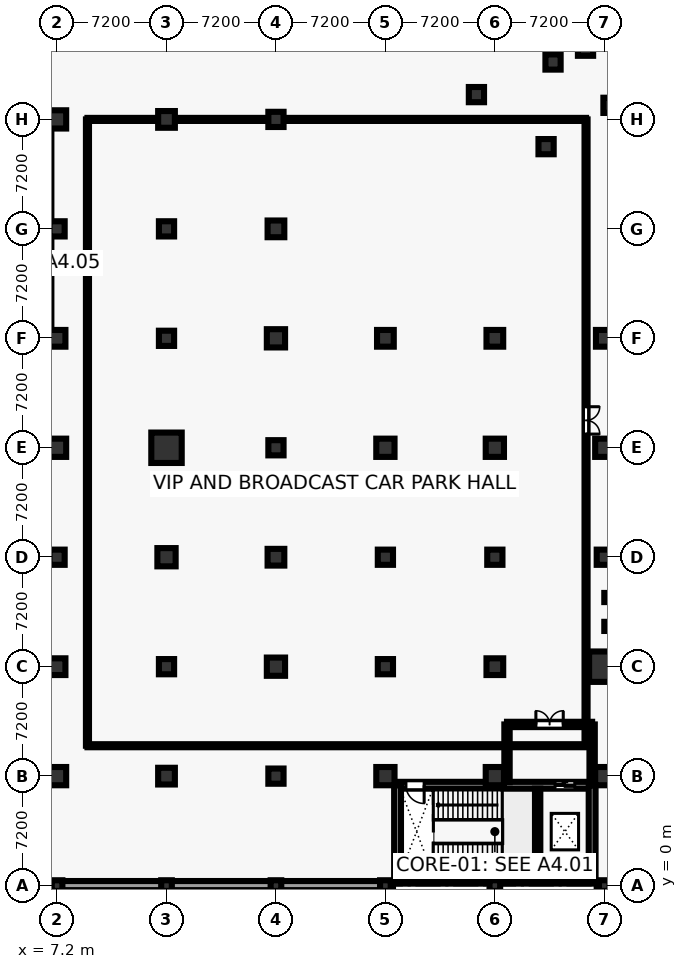
"""IFC4 building model, lengths in metres.
Left out: names, types, materials, properties, quantities, classifications, styles, units other than length and angle.
Written with IfcOpenShell. Run it as: python <this file> out.ifc"""

import sys

from ifc_helpers import new_model, si_unit, direction, frame, frame_2d, origin, origin_with_axes, origin_2d, place, context, subcontext, project, spatial, rectangle, circle, extrude, element, fill, save


model = new_model("IFC4")
c1 = context("Model", 3, precision=1e-05, world=origin(), true_north=direction((0.0, 1.0)))
c2 = subcontext(c1, "Body", "Model", "MODEL_VIEW")
j1 = project(units=[si_unit("LENGTHUNIT", "METRE"), si_unit("PLANEANGLEUNIT", "RADIAN")], contexts=[c1])
p1 = place(None, origin())
s1 = spatial("IfcSite", under=j1, at=p1, CompositionType="ELEMENT")
p2 = place(p1, origin())
s2 = spatial("IfcBuilding", under=s1, at=p2, CompositionType="ELEMENT")
p3 = place(p2, frame((0.0, 0.0, -5.4)))
s3 = spatial("IfcBuildingStorey", under=s2, at=p3, CompositionType="ELEMENT", Elevation=-5.4)
p4 = place(p3, frame((7.2, 0.0, 0.0), z_axis=(0.0, 0.0, 1.0), x_axis=(1.0, 0.0, 0.0)))
e1 = element("IfcColumn", 1, at=p4, inside=s3, PredefinedType="COLUMN", context=c2, shape_type="SweptSolid", body=[
    extrude(rectangle(XDim=0.7, YDim=0.7, at=origin_2d()), origin(), (0.0, 0.0, 1.0), 5.4),
])
p5 = place(p3, frame((7.2, 7.2, 0.0), z_axis=(0.0, 0.0, 1.0), x_axis=(1.0, 0.0, 0.0)))
e2 = element("IfcColumn", 2, at=p5, inside=s3, PredefinedType="COLUMN", context=c2, shape_type="SweptSolid", body=[
    extrude(circle(Radius=0.6, at=origin_2d()), origin(), (0.0, 0.0, 1.0), 5.4),
])
p6 = place(p3, frame((7.2, 14.4, 0.0), z_axis=(0.0, 0.0, 1.0), x_axis=(1.0, 0.0, 0.0)))
e3 = element("IfcColumn", 3, at=p6, inside=s3, PredefinedType="COLUMN", context=c2, shape_type="SweptSolid", body=[
    extrude(rectangle(XDim=1.1, YDim=1.1, at=origin_2d()), origin(), (0.0, 0.0, 1.0), 5.4),
])
p7 = place(p3, frame((7.2, 21.6, 0.0), z_axis=(0.0, 0.0, 1.0), x_axis=(1.0, 0.0, 0.0)))
e4 = element("IfcColumn", 4, at=p7, inside=s3, PredefinedType="COLUMN", context=c2, shape_type="SweptSolid", body=[
    extrude(rectangle(XDim=1.0, YDim=1.0, at=origin_2d()), origin(), (0.0, 0.0, 1.0), 5.4),
])
p8 = place(p3, frame((7.2, 28.8, 0.0), z_axis=(0.0, 0.0, 1.0), x_axis=(1.0, 0.0, 0.0)))
e5 = element("IfcColumn", 5, at=p8, inside=s3, PredefinedType="COLUMN", context=c2, shape_type="SweptSolid", body=[
    extrude(circle(Radius=0.6, at=origin_2d()), origin(), (0.0, 0.0, 1.0), 5.4),
])
p9 = place(p3, frame((7.2, 36.0, 0.0), z_axis=(0.0, 0.0, 1.0), x_axis=(1.0, 0.0, 0.0)))
e6 = element("IfcColumn", 6, at=p9, inside=s3, PredefinedType="COLUMN", context=c2, shape_type="SweptSolid", body=[
    extrude(rectangle(XDim=1.1, YDim=1.1, at=origin_2d()), origin(), (0.0, 0.0, 1.0), 5.4),
])
p10 = place(p3, frame((7.2, 43.2, 0.0), z_axis=(0.0, 0.0, 1.0), x_axis=(1.0, 0.0, 0.0)))
e7 = element("IfcColumn", 7, at=p10, inside=s3, PredefinedType="COLUMN", context=c2, shape_type="SweptSolid", body=[
    extrude(rectangle(XDim=1.0, YDim=1.0, at=origin_2d()), origin(), (0.0, 0.0, 1.0), 5.4),
])
p11 = place(p3, frame((7.2, 50.4, 0.0), z_axis=(0.0, 0.0, 1.0), x_axis=(1.0, 0.0, 0.0)))
e8 = element("IfcColumn", 8, at=p11, inside=s3, PredefinedType="COLUMN", context=c2, shape_type="SweptSolid", body=[
    extrude(circle(Radius=0.6, at=origin_2d()), origin(), (0.0, 0.0, 1.0), 5.4),
])
p12 = place(p3, frame((14.4, 0.0, 0.0), z_axis=(0.0, 0.0, 1.0), x_axis=(1.0, 0.0, 0.0)))
e9 = element("IfcColumn", 9, at=p12, inside=s3, PredefinedType="COLUMN", context=c2, shape_type="SweptSolid", body=[
    extrude(rectangle(XDim=0.7, YDim=0.7, at=origin_2d()), origin(), (0.0, 0.0, 1.0), 5.4),
])
p13 = place(p3, frame((14.4, 7.2, 0.0), z_axis=(0.0, 0.0, 1.0), x_axis=(1.0, 0.0, 0.0)))
e10 = element("IfcColumn", 10, at=p13, inside=s3, PredefinedType="COLUMN", context=c2, shape_type="SweptSolid", body=[
    extrude(rectangle(XDim=1.1, YDim=1.1, at=origin_2d()), origin(), (0.0, 0.0, 1.0), 5.4),
])
p14 = place(p3, frame((14.4, 14.4, 0.0), z_axis=(0.0, 0.0, 1.0), x_axis=(1.0, 0.0, 0.0)))
e11 = element("IfcColumn", 11, at=p14, inside=s3, PredefinedType="COLUMN", context=c2, shape_type="SweptSolid", body=[
    extrude(circle(Radius=0.5, at=origin_2d()), origin(), (0.0, 0.0, 1.0), 5.4),
])
p15 = place(p3, frame((14.4, 21.6, 0.0), z_axis=(0.0, 0.0, 1.0), x_axis=(1.0, 0.0, 0.0)))
e12 = element("IfcColumn", 12, at=p15, inside=s3, PredefinedType="COLUMN", context=c2, shape_type="SweptSolid", body=[
    extrude(circle(Radius=0.6, at=origin_2d()), origin(), (0.0, 0.0, 1.0), 5.4),
])
p16 = place(p3, frame((14.4, 28.8, 0.0), z_axis=(0.0, 0.0, 1.0), x_axis=(1.0, 0.0, 0.0)))
e13 = element("IfcColumn", 13, at=p16, inside=s3, PredefinedType="COLUMN", context=c2, shape_type="SweptSolid", body=[
    extrude(circle(Radius=1.0, at=origin_2d()), origin(), (0.0, 0.0, 1.0), 5.4),
])
p17 = place(p3, frame((14.4, 36.0, 0.0), z_axis=(0.0, 0.0, 1.0), x_axis=(1.0, 0.0, 0.0)))
e14 = element("IfcColumn", 14, at=p17, inside=s3, PredefinedType="COLUMN", context=c2, shape_type="SweptSolid", body=[
    extrude(rectangle(XDim=1.0, YDim=1.0, at=origin_2d()), origin(), (0.0, 0.0, 1.0), 5.4),
])
p18 = place(p3, frame((14.4, 43.2, 0.0), z_axis=(0.0, 0.0, 1.0), x_axis=(1.0, 0.0, 0.0)))
e15 = element("IfcColumn", 15, at=p18, inside=s3, PredefinedType="COLUMN", context=c2, shape_type="SweptSolid", body=[
    extrude(circle(Radius=0.5, at=origin_2d()), origin(), (0.0, 0.0, 1.0), 5.4),
])
p19 = place(p3, frame((14.4, 50.4, 0.0), z_axis=(0.0, 0.0, 1.0), x_axis=(1.0, 0.0, 0.0)))
e16 = element("IfcColumn", 16, at=p19, inside=s3, PredefinedType="COLUMN", context=c2, shape_type="SweptSolid", body=[
    extrude(rectangle(XDim=1.1, YDim=1.1, at=origin_2d()), origin(), (0.0, 0.0, 1.0), 5.4),
])
p20 = place(p3, frame((21.6, 0.0, 0.0), z_axis=(0.0, 0.0, 1.0), x_axis=(1.0, 0.0, 0.0)))
e17 = element("IfcColumn", 17, at=p20, inside=s3, PredefinedType="COLUMN", context=c2, shape_type="SweptSolid", body=[
    extrude(rectangle(XDim=0.7, YDim=0.7, at=origin_2d()), origin(), (0.0, 0.0, 1.0), 5.4),
])
p21 = place(p3, frame((21.6, 7.2, 0.0), z_axis=(0.0, 0.0, 1.0), x_axis=(1.0, 0.0, 0.0)))
e18 = element("IfcColumn", 18, at=p21, inside=s3, PredefinedType="COLUMN", context=c2, shape_type="SweptSolid", body=[
    extrude(rectangle(XDim=1.0, YDim=1.0, at=origin_2d()), origin(), (0.0, 0.0, 1.0), 5.4),
])
p22 = place(p3, frame((21.6, 14.4, 0.0), z_axis=(0.0, 0.0, 1.0), x_axis=(1.0, 0.0, 0.0)))
e19 = element("IfcColumn", 19, at=p22, inside=s3, PredefinedType="COLUMN", context=c2, shape_type="SweptSolid", body=[
    extrude(circle(Radius=0.6, at=origin_2d()), origin(), (0.0, 0.0, 1.0), 5.4),
])
p23 = place(p3, frame((21.6, 21.6, 0.0), z_axis=(0.0, 0.0, 1.0), x_axis=(1.0, 0.0, 0.0)))
e20 = element("IfcColumn", 20, at=p23, inside=s3, PredefinedType="COLUMN", context=c2, shape_type="SweptSolid", body=[
    extrude(rectangle(XDim=1.1, YDim=1.1, at=origin_2d()), origin(), (0.0, 0.0, 1.0), 5.4),
])
p24 = place(p3, frame((21.6, 28.8, 0.0), z_axis=(0.0, 0.0, 1.0), x_axis=(1.0, 0.0, 0.0)))
e21 = element("IfcColumn", 21, at=p24, inside=s3, PredefinedType="COLUMN", context=c2, shape_type="SweptSolid", body=[
    extrude(rectangle(XDim=1.0, YDim=1.0, at=origin_2d()), origin(), (0.0, 0.0, 1.0), 5.4),
])
p25 = place(p3, frame((21.6, 36.0, 0.0), z_axis=(0.0, 0.0, 1.0), x_axis=(1.0, 0.0, 0.0)))
e22 = element("IfcColumn", 22, at=p25, inside=s3, PredefinedType="COLUMN", context=c2, shape_type="SweptSolid", body=[
    extrude(circle(Radius=0.6, at=origin_2d()), origin(), (0.0, 0.0, 1.0), 5.4),
])
p26 = place(p3, frame((21.6, 43.2, 0.0), z_axis=(0.0, 0.0, 1.0), x_axis=(1.0, 0.0, 0.0)))
e23 = element("IfcColumn", 23, at=p26, inside=s3, PredefinedType="COLUMN", context=c2, shape_type="SweptSolid", body=[
    extrude(rectangle(XDim=1.1, YDim=1.1, at=origin_2d()), origin(), (0.0, 0.0, 1.0), 5.4),
])
p27 = place(p3, frame((21.6, 50.4, 0.0), z_axis=(0.0, 0.0, 1.0), x_axis=(1.0, 0.0, 0.0)))
e24 = element("IfcColumn", 24, at=p27, inside=s3, PredefinedType="COLUMN", context=c2, shape_type="SweptSolid", body=[
    extrude(rectangle(XDim=1.0, YDim=1.0, at=origin_2d()), origin(), (0.0, 0.0, 1.0), 5.4),
])
p28 = place(p3, frame((28.8, 0.0, 0.0), z_axis=(0.0, 0.0, 1.0), x_axis=(1.0, 0.0, 0.0)))
e25 = element("IfcColumn", 25, at=p28, inside=s3, PredefinedType="COLUMN", context=c2, shape_type="SweptSolid", body=[
    extrude(rectangle(XDim=0.7, YDim=0.7, at=origin_2d()), origin(), (0.0, 0.0, 1.0), 5.4),
])
p29 = place(p3, frame((28.8, 7.2, 0.0), z_axis=(0.0, 0.0, 1.0), x_axis=(1.0, 0.0, 0.0)))
e26 = element("IfcColumn", 26, at=p29, inside=s3, PredefinedType="COLUMN", context=c2, shape_type="SweptSolid", body=[
    extrude(circle(Radius=0.6, at=origin_2d()), origin(), (0.0, 0.0, 1.0), 5.4),
])
p30 = place(p3, frame((28.8, 14.4, 0.0), z_axis=(0.0, 0.0, 1.0), x_axis=(1.0, 0.0, 0.0)))
e27 = element("IfcColumn", 27, at=p30, inside=s3, PredefinedType="COLUMN", context=c2, shape_type="SweptSolid", body=[
    extrude(circle(Radius=0.5, at=origin_2d()), origin(), (0.0, 0.0, 1.0), 5.4),
])
p31 = place(p3, frame((28.8, 21.6, 0.0), z_axis=(0.0, 0.0, 1.0), x_axis=(1.0, 0.0, 0.0)))
e28 = element("IfcColumn", 28, at=p31, inside=s3, PredefinedType="COLUMN", context=c2, shape_type="SweptSolid", body=[
    extrude(rectangle(XDim=1.0, YDim=1.0, at=origin_2d()), origin(), (0.0, 0.0, 1.0), 5.4),
])
p32 = place(p3, frame((28.8, 28.8, 0.0), z_axis=(0.0, 0.0, 1.0), x_axis=(1.0, 0.0, 0.0)))
e29 = element("IfcColumn", 29, at=p32, inside=s3, PredefinedType="COLUMN", context=c2, shape_type="SweptSolid", body=[
    extrude(circle(Radius=0.6, at=origin_2d()), origin(), (0.0, 0.0, 1.0), 5.4),
])
p33 = place(p3, frame((28.8, 36.0, 0.0), z_axis=(0.0, 0.0, 1.0), x_axis=(1.0, 0.0, 0.0)))
e30 = element("IfcColumn", 30, at=p33, inside=s3, PredefinedType="COLUMN", context=c2, shape_type="SweptSolid", body=[
    extrude(rectangle(XDim=1.1, YDim=1.1, at=origin_2d()), origin(), (0.0, 0.0, 1.0), 5.4),
])
p34 = place(p3, frame((36.0, 0.0, 0.0), z_axis=(0.0, 0.0, 1.0), x_axis=(1.0, 0.0, 0.0)))
e31 = element("IfcColumn", 31, at=p34, inside=s3, PredefinedType="COLUMN", context=c2, shape_type="SweptSolid", body=[
    extrude(rectangle(XDim=0.7, YDim=0.7, at=origin_2d()), origin(), (0.0, 0.0, 1.0), 5.4),
])
p35 = place(p3, frame((36.0, 7.2, 0.0), z_axis=(0.0, 0.0, 1.0), x_axis=(1.0, 0.0, 0.0)))
e32 = element("IfcColumn", 32, at=p35, inside=s3, PredefinedType="COLUMN", context=c2, shape_type="SweptSolid", body=[
    extrude(circle(Radius=0.6, at=origin_2d()), origin(), (0.0, 0.0, 1.0), 5.4),
])
p36 = place(p3, frame((36.0, 14.4, 0.0), z_axis=(0.0, 0.0, 1.0), x_axis=(1.0, 0.0, 0.0)))
e33 = element("IfcColumn", 33, at=p36, inside=s3, PredefinedType="COLUMN", context=c2, shape_type="SweptSolid", body=[
    extrude(rectangle(XDim=1.1, YDim=1.1, at=origin_2d()), origin(), (0.0, 0.0, 1.0), 5.4),
])
p37 = place(p3, frame((36.0, 21.6, 0.0), z_axis=(0.0, 0.0, 1.0), x_axis=(1.0, 0.0, 0.0)))
e34 = element("IfcColumn", 34, at=p37, inside=s3, PredefinedType="COLUMN", context=c2, shape_type="SweptSolid", body=[
    extrude(rectangle(XDim=1.0, YDim=1.0, at=origin_2d()), origin(), (0.0, 0.0, 1.0), 5.4),
])
p38 = place(p3, frame((36.0, 28.8, 0.0), z_axis=(0.0, 0.0, 1.0), x_axis=(1.0, 0.0, 0.0)))
e35 = element("IfcColumn", 35, at=p38, inside=s3, PredefinedType="COLUMN", context=c2, shape_type="SweptSolid", body=[
    extrude(circle(Radius=0.6, at=origin_2d()), origin(), (0.0, 0.0, 1.0), 5.4),
])
p39 = place(p3, frame((36.0, 36.0, 0.0), z_axis=(0.0, 0.0, 1.0), x_axis=(1.0, 0.0, 0.0)))
e36 = element("IfcColumn", 36, at=p39, inside=s3, PredefinedType="COLUMN", context=c2, shape_type="SweptSolid", body=[
    extrude(rectangle(XDim=1.1, YDim=1.1, at=origin_2d()), origin(), (0.0, 0.0, 1.0), 5.4),
])
p40 = place(p3, frame((43.2, 0.0, 0.0), z_axis=(0.0, 0.0, 1.0), x_axis=(1.0, 0.0, 0.0)))
e37 = element("IfcColumn", 37, at=p40, inside=s3, PredefinedType="COLUMN", context=c2, shape_type="SweptSolid", body=[
    extrude(rectangle(XDim=0.7, YDim=0.7, at=origin_2d()), origin(), (0.0, 0.0, 1.0), 5.4),
])
p41 = place(p3, frame((43.2, 7.2, 0.0), z_axis=(0.0, 0.0, 1.0), x_axis=(1.0, 0.0, 0.0)))
e38 = element("IfcColumn", 38, at=p41, inside=s3, PredefinedType="COLUMN", context=c2, shape_type="SweptSolid", body=[
    extrude(circle(Radius=0.6, at=origin_2d()), origin(), (0.0, 0.0, 1.0), 5.4),
])
p42 = place(p3, frame((43.2, 14.4, 0.0), z_axis=(0.0, 0.0, 1.0), x_axis=(1.0, 0.0, 0.0)))
e39 = element("IfcColumn", 39, at=p42, inside=s3, PredefinedType="COLUMN", context=c2, shape_type="SweptSolid", body=[
    extrude(circle(Radius=1.0, at=origin_2d()), origin(), (0.0, 0.0, 1.0), 5.4),
])
p43 = place(p3, frame((43.2, 21.6, 0.0), z_axis=(0.0, 0.0, 1.0), x_axis=(1.0, 0.0, 0.0)))
e40 = element("IfcColumn", 40, at=p43, inside=s3, PredefinedType="COLUMN", context=c2, shape_type="SweptSolid", body=[
    extrude(rectangle(XDim=1.0, YDim=1.0, at=origin_2d()), origin(), (0.0, 0.0, 1.0), 5.4),
])
p44 = place(p3, frame((43.2, 28.8, 0.0), z_axis=(0.0, 0.0, 1.0), x_axis=(1.0, 0.0, 0.0)))
e41 = element("IfcColumn", 41, at=p44, inside=s3, PredefinedType="COLUMN", context=c2, shape_type="SweptSolid", body=[
    extrude(circle(Radius=0.6, at=origin_2d()), origin(), (0.0, 0.0, 1.0), 5.4),
])
p45 = place(p3, frame((43.2, 36.0, 0.0), z_axis=(0.0, 0.0, 1.0), x_axis=(1.0, 0.0, 0.0)))
e42 = element("IfcColumn", 42, at=p45, inside=s3, PredefinedType="COLUMN", context=c2, shape_type="SweptSolid", body=[
    extrude(rectangle(XDim=1.1, YDim=1.1, at=origin_2d()), origin(), (0.0, 0.0, 1.0), 5.4),
])
p46 = place(p3, origin_with_axes())
e43 = element("IfcWall", 43, at=p46, inside=s3, PredefinedType="USERDEFINED", context=c2, shape_type="SweptSolid", body=[
    extrude(rectangle(XDim=29.3, YDim=0.6, at=frame_2d((14.65, 0.0))), origin(), (0.0, 0.0, 1.0), 4.98),
])
p47 = place(p3, frame((42.7, 0.0, 0.0), z_axis=(0.0, 0.0, 1.0), x_axis=(1.0, 0.0, 0.0)))
e44 = element("IfcWall", 44, at=p47, inside=s3, PredefinedType="USERDEFINED", context=c2, shape_type="SweptSolid", body=[
    extrude(rectangle(XDim=29.8, YDim=0.6, at=frame_2d((14.9, 0.0))), origin(), (0.0, 0.0, 1.0), 4.98),
])
p48 = place(p3, frame((29.6, 0.5, 0.0), z_axis=(0.0, 0.0, 1.0), x_axis=(1.0, 0.0, 0.0)))
e45 = element("IfcWall", 45, at=p48, inside=s3, PredefinedType="SHEAR", context=c2, shape_type="SweptSolid", body=[
    extrude(rectangle(XDim=12.8, YDim=0.45, at=frame_2d((6.4, 0.0))), origin(), (0.0, 0.0, 1.0), 5.02),
])
p49 = place(p3, frame((29.6, 6.6, 0.0), z_axis=(0.0, 0.0, 1.0), x_axis=(1.0, 0.0, 0.0)))
e46 = element("IfcWall", 46, at=p49, inside=s3, PredefinedType="SHEAR", context=c2, shape_type="SweptSolid", body=[
    extrude(rectangle(XDim=12.8, YDim=0.45, at=frame_2d((6.4, 0.0))), origin(), (0.0, 0.0, 1.0), 5.02),
])
p50 = place(p49, frame((0.55, 0.0, 0.0)))
e47 = element("IfcOpeningElement", 47, at=p50, cuts=e46, PredefinedType="OPENING", context=c2, shape_type="SweptSolid", body=[
    extrude(rectangle(XDim=1.2, YDim=2.25, at=frame_2d((0.6, 1.125))), frame((0.0, 0.235, 0.0), z_axis=(0.0, -1.0, 0.0), x_axis=(1.0, 0.0, 0.0)), (0.0, 0.0, 1.0), 0.47),
])
p51 = place(p49, frame((10.358, 0.0, 0.0)))
e48 = element("IfcOpeningElement", 48, at=p51, cuts=e46, PredefinedType="OPENING", context=c2, shape_type="SweptSolid", body=[
    extrude(rectangle(XDim=1.3, YDim=2.25, at=frame_2d((0.65, 1.125))), frame((0.0, 0.235, 0.0), z_axis=(0.0, -1.0, 0.0), x_axis=(1.0, 0.0, 0.0)), (0.0, 0.0, 1.0), 0.47),
])
for number, where, z_axis, x_axis in (
    (49, (29.6, 0.5, 0.0), (0.0, 0.0, 1.0), (0.0, 1.0, 0.0)),
    (50, (42.4, 0.5, 0.0), (0.0, 0.0, 1.0), (0.0, 1.0, 0.0)),
):
    element("IfcWall", number, at=place(p3, frame(where, z_axis=z_axis, x_axis=x_axis)), inside=s3, PredefinedType="SHEAR", context=c2, shape_type="SweptSolid", body=[
        extrude(rectangle(XDim=6.1, YDim=0.45, at=frame_2d((3.05, 0.0))), origin(), (0.0, 0.0, 1.0), 5.02),
    ])
p52 = place(p3, frame((38.816, 0.725, 0.0), z_axis=(0.0, 0.0, 1.0), x_axis=(0.0, 1.0, 0.0)))
e51 = element("IfcWall", 51, at=p52, inside=s3, PredefinedType="SHEAR", context=c2, shape_type="SweptSolid", body=[
    extrude(rectangle(XDim=5.65, YDim=0.35, at=frame_2d((2.825, 0.0))), origin(), (0.0, 0.0, 1.0), 5.02),
])
for number, where, z_axis, x_axis in (
    (52, (43.5, 17.05, 0.0), (0.0, 0.0, 1.0), (1.0, 0.0, 0.0)),
    (53, (43.5, 18.95, 0.0), (0.0, 0.0, 1.0), (1.0, 0.0, 0.0)),
):
    element("IfcColumn", number, at=place(p3, frame(where, z_axis=z_axis, x_axis=x_axis)), inside=s3, PredefinedType="COLUMN", context=c2, shape_type="SweptSolid", body=[
        extrude(rectangle(XDim=0.6, YDim=0.6, at=origin_2d()), origin(), (0.0, 0.0, 1.0), 5.4),
    ])
for number, where, z_axis, x_axis in (
    (54, (41.965, 55.084, 0.0), (0.0, 0.0, 1.0), (1.0, 0.0, 0.0)),
    (55, (39.828, 54.175, 0.0), (0.0, 0.0, 1.0), (1.0, 0.0, 0.0)),
    (56, (34.788, 52.031, 0.0), (0.0, 0.0, 1.0), (1.0, 0.0, 0.0)),
    (57, (43.64, 51.326, 0.0), (0.0, 0.0, 1.0), (1.0, 0.0, 0.0)),
    (58, (39.37, 48.608, 0.0), (0.0, 0.0, 1.0), (1.0, 0.0, 0.0)),
):
    element("IfcColumn", number, at=place(p3, frame(where, z_axis=z_axis, x_axis=x_axis)), inside=s3, PredefinedType="COLUMN", context=c2, shape_type="SweptSolid", body=[
        extrude(circle(Radius=0.5, at=origin_2d()), origin(), (0.0, 0.0, 1.0), 5.4),
    ])
p53 = place(p3, frame((42.4, 6.8, 0.0), z_axis=(0.0, 0.0, 1.0), x_axis=(0.0, 1.0, 0.0)))
e59 = element("IfcWall", 59, at=p53, inside=s3, PredefinedType="SHEAR", context=c2, shape_type="SweptSolid", body=[
    extrude(rectangle(XDim=3.8, YDim=0.35, at=frame_2d((1.9, 0.0))), origin(), (0.0, 0.0, 1.0), 4.04),
])
p54 = place(p3, frame((42.4, 10.6, 0.0), z_axis=(0.0, 0.0, 1.0), x_axis=(-1.0, 0.0, 0.0)))
e60 = element("IfcWall", 60, at=p54, inside=s3, PredefinedType="SHEAR", context=c2, shape_type="SweptSolid", body=[
    extrude(rectangle(XDim=5.6, YDim=0.35, at=frame_2d((2.8, 0.0))), origin(), (0.0, 0.0, 1.0), 4.04),
])
p55 = place(p54, frame((1.9, 0.0, 0.0)))
e61 = element("IfcOpeningElement", 61, at=p55, cuts=e60, PredefinedType="OPENING", context=c2, shape_type="SweptSolid", body=[
    extrude(rectangle(XDim=1.8, YDim=2.3, at=frame_2d((0.9, 1.15))), frame((0.0, 0.185, 0.0), z_axis=(0.0, -1.0, 0.0), x_axis=(1.0, 0.0, 0.0)), (0.0, 0.0, 1.0), 0.37),
])
p56 = place(p3, frame((36.8, 10.6, 0.0), z_axis=(0.0, 0.0, 1.0), x_axis=(0.0, -1.0, 0.0)))
e62 = element("IfcWall", 62, at=p56, inside=s3, PredefinedType="SHEAR", context=c2, shape_type="SweptSolid", body=[
    extrude(rectangle(XDim=3.8, YDim=0.35, at=frame_2d((1.9, 0.0))), origin(), (0.0, 0.0, 1.0), 4.04),
])
p57 = place(p3, frame((9.2, 9.2, 0.0), z_axis=(0.0, 0.0, 1.0), x_axis=(1.0, 0.0, 0.0)))
e63 = element("IfcWall", 63, at=p57, inside=s3, PredefinedType="PARTITIONING", context=c2, shape_type="SweptSolid", body=[
    extrude(rectangle(XDim=32.8, YDim=0.2, at=frame_2d((16.4, 0.0))), origin(), (0.0, 0.0, 1.0), 4.04),
])
p58 = place(p3, frame((42.0, 9.2, 0.0), z_axis=(0.0, 0.0, 1.0), x_axis=(0.0, 1.0, 0.0)))
e64 = element("IfcWall", 64, at=p58, inside=s3, PredefinedType="PARTITIONING", context=c2, shape_type="SweptSolid", body=[
    extrude(rectangle(XDim=41.2, YDim=0.2, at=frame_2d((20.6, 0.0))), origin(), (0.0, 0.0, 1.0), 4.04),
])
p59 = place(p58, frame((20.5, 0.0, 0.0)))
e65 = element("IfcOpeningElement", 65, at=p59, cuts=e64, PredefinedType="OPENING", context=c2, shape_type="SweptSolid", body=[
    extrude(rectangle(XDim=1.8, YDim=2.3, at=frame_2d((0.9, 1.15))), frame((0.0, 0.11, 0.0), z_axis=(0.0, -1.0, 0.0), x_axis=(1.0, 0.0, 0.0)), (0.0, 0.0, 1.0), 0.22),
])
p60 = place(p3, frame((42.0, 50.4, 0.0), z_axis=(0.0, 0.0, 1.0), x_axis=(-1.0, 0.0, 0.0)))
e66 = element("IfcWall", 66, at=p60, inside=s3, PredefinedType="PARTITIONING", context=c2, shape_type="SweptSolid", body=[
    extrude(rectangle(XDim=32.8, YDim=0.2, at=frame_2d((16.4, 0.0))), origin(), (0.0, 0.0, 1.0), 4.04),
])
p61 = place(p3, frame((9.2, 50.4, 0.0), z_axis=(0.0, 0.0, 1.0), x_axis=(0.0, -1.0, 0.0)))
e67 = element("IfcWall", 67, at=p61, inside=s3, PredefinedType="PARTITIONING", context=c2, shape_type="SweptSolid", body=[
    extrude(rectangle(XDim=41.2, YDim=0.2, at=frame_2d((20.6, 0.0))), origin(), (0.0, 0.0, 1.0), 4.04),
])
p62 = place(p50, frame((1.2, 0.0, 0.0), z_axis=(0.0, 0.0, 1.0), x_axis=(-1.0, 0.0, 0.0)))
e68 = element("IfcDoor", 68, at=p62, inside=s3, OperationType="SINGLE_SWING_RIGHT", PredefinedType="DOOR", context=c2, shape_type="SweptSolid", body=[
    extrude(rectangle(XDim=1.2, YDim=2.25, at=frame_2d((0.6, 1.125))), frame((0.0, 0.025, 0.0), z_axis=(0.0, -1.0, 0.0), x_axis=(1.0, 0.0, 0.0)), (0.0, 0.0, 1.0), 0.05),
])
fill(e47, e68)
p63 = place(p51, origin())
e69 = element("IfcDoor", 69, at=p63, inside=s3, OperationType="SLIDING_TO_LEFT", PredefinedType="DOOR", context=c2, shape_type="SweptSolid", body=[
    extrude(rectangle(XDim=1.3, YDim=2.25, at=frame_2d((0.65, 1.125))), frame((0.0, 0.025, 0.0), z_axis=(0.0, -1.0, 0.0), x_axis=(1.0, 0.0, 0.0)), (0.0, 0.0, 1.0), 0.05),
])
fill(e48, e69)
p64 = place(p55, frame((1.8, 0.0, 0.0), z_axis=(0.0, 0.0, 1.0), x_axis=(-1.0, 0.0, 0.0)))
e70 = element("IfcDoor", 70, at=p64, inside=s3, OperationType="DOUBLE_DOOR_SINGLE_SWING", PredefinedType="DOOR", context=c2, shape_type="SweptSolid", body=[
    extrude(rectangle(XDim=1.8, YDim=2.3, at=frame_2d((0.9, 1.15))), frame((0.0, 0.025, 0.0), z_axis=(0.0, -1.0, 0.0), x_axis=(1.0, 0.0, 0.0)), (0.0, 0.0, 1.0), 0.05),
])
fill(e61, e70)
p65 = place(p59, frame((1.8, 0.0, 0.0), z_axis=(0.0, 0.0, 1.0), x_axis=(-1.0, 0.0, 0.0)))
e71 = element("IfcDoor", 71, at=p65, inside=s3, OperationType="DOUBLE_DOOR_SINGLE_SWING", PredefinedType="DOOR", context=c2, shape_type="SweptSolid", body=[
    extrude(rectangle(XDim=1.8, YDim=2.3, at=frame_2d((0.9, 1.15))), frame((0.0, 0.025, 0.0), z_axis=(0.0, -1.0, 0.0), x_axis=(1.0, 0.0, 0.0)), (0.0, 0.0, 1.0), 0.05),
])
fill(e65, e71)
save(model, sys.argv[1])
